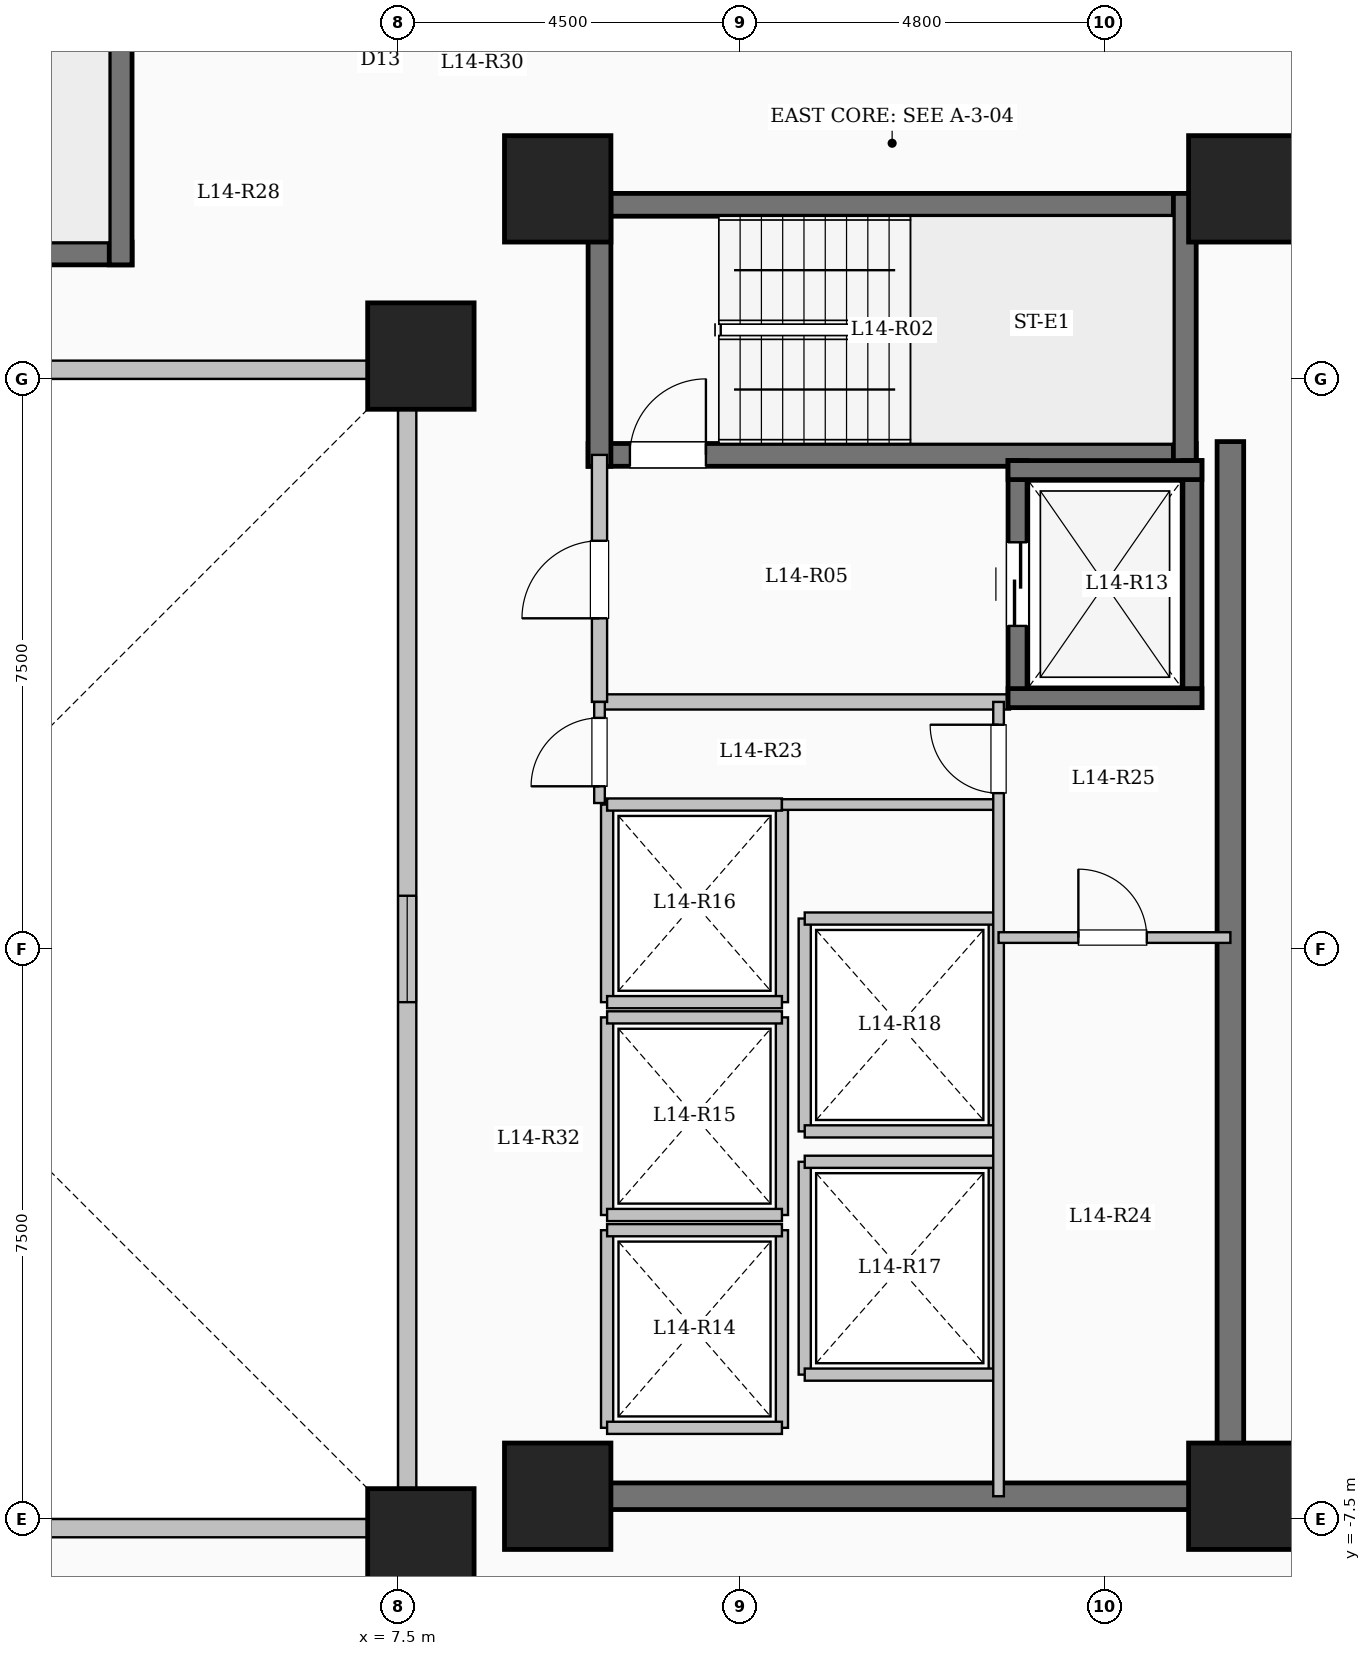
"""IFC4 building model, lengths in metres.
Left out: names, types, materials, properties, quantities, classifications, styles, units other than length and angle.
Written with IfcOpenShell. Run it as: python <this file> out.ifc"""

import sys

from ifc_helpers import new_model, si_unit, direction, frame, frame_2d, origin, origin_2d, place, context, subcontext, project, spatial, rectangle, extrude, element, fill, save


model = new_model("IFC4")
c1 = context("Model", 3, precision=1e-05, world=origin(), true_north=direction((0.0, 1.0)))
c2 = subcontext(c1, "Body", "Model", "MODEL_VIEW")
j1 = project(units=[si_unit("LENGTHUNIT", "METRE"), si_unit("PLANEANGLEUNIT", "RADIAN")], contexts=[c1])
p1 = place(None, origin())
s1 = spatial("IfcSite", under=j1, at=p1, CompositionType="ELEMENT")
p2 = place(p1, origin())
s2 = spatial("IfcBuilding", under=s1, at=p2, CompositionType="ELEMENT")
p3 = place(p2, frame((0.0, 0.0, 54.15)))
s3 = spatial("IfcBuildingStorey", under=s2, at=p3, CompositionType="ELEMENT", Elevation=54.15)
for number, where, z_axis, x_axis in (
    (1, (7.8, -7.8, 0.0), (0.0, 0.0, 1.0), (1.0, 0.0, 0.0)),
    (2, (7.8, 7.8, 0.0), (0.0, 0.0, 1.0), (1.0, 0.0, 0.0)),
    (3, (9.6, -7.2, 0.0), (0.0, 0.0, 1.0), (1.0, 0.0, 0.0)),
    (4, (9.6, 10.0, 0.0), (0.0, 0.0, 1.0), (1.0, 0.0, 0.0)),
    (5, (18.6, -7.2, 0.0), (0.0, 0.0, 1.0), (1.0, 0.0, 0.0)),
    (6, (18.6, 10.0, 0.0), (0.0, 0.0, 1.0), (1.0, 0.0, 0.0)),
):
    element("IfcColumn", number, at=place(p3, frame(where, z_axis=z_axis, x_axis=x_axis)), inside=s3, PredefinedType="COLUMN", context=c2, shape_type="SweptSolid", body=[
        extrude(rectangle(XDim=1.4, YDim=1.4, at=origin_2d()), origin(), (0.0, 0.0, 1.0), 3.35),
    ])
p4 = place(p3, frame((-7.62, -7.62, 0.0), z_axis=(0.0, 0.0, 1.0), x_axis=(1.0, 0.0, 0.0)))
e7 = element("IfcWall", 7, at=p4, inside=s3, PredefinedType="SOLIDWALL", context=c2, shape_type="SweptSolid", body=[
    extrude(rectangle(XDim=15.24, YDim=0.24, at=frame_2d((7.62, 0.0))), origin(), (0.0, 0.0, 1.0), 3.1),
])
p5 = place(p4, frame((6.92, 0.0, 0.95)))
e8 = element("IfcOpeningElement", 8, at=p5, cuts=e7, PredefinedType="OPENING", context=c2, shape_type="SweptSolid", body=[
    extrude(rectangle(XDim=1.4, YDim=1.5, at=frame_2d((0.7, 0.75))), frame((0.0, 0.13, 0.0), z_axis=(0.0, -1.0, 0.0), x_axis=(1.0, 0.0, 0.0)), (0.0, 0.0, 1.0), 0.26),
])
p6 = place(p3, frame((7.62, -7.62, 0.0), z_axis=(0.0, 0.0, 1.0), x_axis=(0.0, 1.0, 0.0)))
e9 = element("IfcWall", 9, at=p6, inside=s3, PredefinedType="SOLIDWALL", context=c2, shape_type="SweptSolid", body=[
    extrude(rectangle(XDim=15.24, YDim=0.24, at=frame_2d((7.62, 0.0))), origin(), (0.0, 0.0, 1.0), 3.1),
])
p7 = place(p6, frame((6.92, 0.0, 0.95)))
e10 = element("IfcOpeningElement", 10, at=p7, cuts=e9, PredefinedType="OPENING", context=c2, shape_type="SweptSolid", body=[
    extrude(rectangle(XDim=1.4, YDim=1.5, at=frame_2d((0.7, 0.75))), frame((0.0, 0.13, 0.0), z_axis=(0.0, -1.0, 0.0), x_axis=(1.0, 0.0, 0.0)), (0.0, 0.0, 1.0), 0.26),
])
p8 = place(p3, frame((7.62, 7.62, 0.0), z_axis=(0.0, 0.0, 1.0), x_axis=(-1.0, 0.0, 0.0)))
e11 = element("IfcWall", 11, at=p8, inside=s3, PredefinedType="SOLIDWALL", context=c2, shape_type="SweptSolid", body=[
    extrude(rectangle(XDim=15.24, YDim=0.24, at=frame_2d((7.62, 0.0))), origin(), (0.0, 0.0, 1.0), 3.1),
])
p9 = place(p8, frame((6.92, 0.0, 0.95)))
e12 = element("IfcOpeningElement", 12, at=p9, cuts=e11, PredefinedType="OPENING", context=c2, shape_type="SweptSolid", body=[
    extrude(rectangle(XDim=1.4, YDim=1.5, at=frame_2d((0.7, 0.75))), frame((0.0, 0.13, 0.0), z_axis=(0.0, -1.0, 0.0), x_axis=(1.0, 0.0, 0.0)), (0.0, 0.0, 1.0), 0.26),
])
p10 = place(p3, frame((10.0, 9.79, 0.0), z_axis=(0.0, 0.0, 1.0), x_axis=(1.0, 0.0, 0.0)))
e13 = element("IfcWall", 13, at=p10, inside=s3, PredefinedType="SHEAR", context=c2, shape_type="SweptSolid", body=[
    extrude(rectangle(XDim=8.0, YDim=0.3, at=frame_2d((4.0, 0.0))), origin(), (0.0, 0.0, 1.0), 3.35),
])
p11 = place(p3, frame((10.0, 6.5, 0.0), z_axis=(0.0, 0.0, 1.0), x_axis=(1.0, 0.0, 0.0)))
e14 = element("IfcWall", 14, at=p11, inside=s3, PredefinedType="SHEAR", context=c2, shape_type="SweptSolid", body=[
    extrude(rectangle(XDim=8.0, YDim=0.3, at=frame_2d((4.0, 0.0))), origin(), (0.0, 0.0, 1.0), 3.35),
])
p12 = place(p11, frame((0.55, 0.0, 0.0)))
e15 = element("IfcOpeningElement", 15, at=p12, cuts=e14, PredefinedType="OPENING", context=c2, shape_type="SweptSolid", body=[
    extrude(rectangle(XDim=1.0, YDim=2.15, at=frame_2d((0.5, 1.075))), frame((0.0, 0.16, 0.0), z_axis=(0.0, -1.0, 0.0), x_axis=(1.0, 0.0, 0.0)), (0.0, 0.0, 1.0), 0.32),
])
for number, where, z_axis, x_axis in (
    (16, (10.15, 6.35, 0.0), (0.0, 0.0, 1.0), (0.0, 1.0, 0.0)),
    (17, (17.85, 6.35, 0.0), (0.0, 0.0, 1.0), (0.0, 1.0, 0.0)),
):
    element("IfcWall", number, at=place(p3, frame(where, z_axis=z_axis, x_axis=x_axis)), inside=s3, PredefinedType="SHEAR", context=c2, shape_type="SweptSolid", body=[
        extrude(rectangle(XDim=3.59, YDim=0.3, at=frame_2d((1.795, 0.0))), origin(), (0.0, 0.0, 1.0), 3.35),
    ])
p13 = place(p3, frame((-4.0, 9.15, 0.0), z_axis=(0.0, 0.0, 1.0), x_axis=(1.0, 0.0, 0.0)))
e18 = element("IfcWall", 18, at=p13, inside=s3, PredefinedType="SHEAR", context=c2, shape_type="SweptSolid", body=[
    extrude(rectangle(XDim=8.0, YDim=0.3, at=frame_2d((4.0, 0.0))), origin(), (0.0, 0.0, 1.0), 3.35),
])
p14 = place(p13, frame((0.55, 0.0, 0.0)))
e19 = element("IfcOpeningElement", 19, at=p14, cuts=e18, PredefinedType="OPENING", context=c2, shape_type="SweptSolid", body=[
    extrude(rectangle(XDim=1.0, YDim=2.15, at=frame_2d((0.5, 1.075))), frame((0.0, 0.16, 0.0), z_axis=(0.0, -1.0, 0.0), x_axis=(1.0, 0.0, 0.0)), (0.0, 0.0, 1.0), 0.32),
])
p15 = place(p3, frame((3.85, 9.0, 0.0), z_axis=(0.0, 0.0, 1.0), x_axis=(0.0, 1.0, 0.0)))
e20 = element("IfcWall", 20, at=p15, inside=s3, PredefinedType="SHEAR", context=c2, shape_type="SweptSolid", body=[
    extrude(rectangle(XDim=3.59, YDim=0.3, at=frame_2d((1.795, 0.0))), origin(), (0.0, 0.0, 1.0), 3.35),
])
p16 = place(p3, frame((10.15, 3.25, 0.0), z_axis=(0.0, 0.0, 1.0), x_axis=(1.0, 0.0, 0.0)))
e21 = element("IfcWall", 21, at=p16, inside=s3, PredefinedType="SOLIDWALL", context=c2, shape_type="SweptSolid", body=[
    extrude(rectangle(XDim=5.4, YDim=0.2, at=frame_2d((2.7, 0.0))), origin(), (0.0, 0.0, 1.0), 3.1),
])
p17 = place(p3, frame((10.15, 3.25, 0.0), z_axis=(0.0, 0.0, 1.0), x_axis=(0.0, 1.0, 0.0)))
e22 = element("IfcWall", 22, at=p17, inside=s3, PredefinedType="SOLIDWALL", context=c2, shape_type="SweptSolid", body=[
    extrude(rectangle(XDim=3.25, YDim=0.2, at=frame_2d((1.625, 0.0))), origin(), (0.0, 0.0, 1.0), 3.1),
])
p18 = place(p17, frame((1.1, 0.0, 0.0)))
e23 = element("IfcOpeningElement", 23, at=p18, cuts=e22, PredefinedType="OPENING", context=c2, shape_type="SweptSolid", body=[
    extrude(rectangle(XDim=1.02, YDim=2.15, at=frame_2d((0.51, 1.075))), frame((0.0, 0.11, 0.0), z_axis=(0.0, -1.0, 0.0), x_axis=(1.0, 0.0, 0.0)), (0.0, 0.0, 1.0), 0.22),
])
p19 = place(p3, frame((15.65, 3.175, 0.0), z_axis=(0.0, 0.0, 1.0), x_axis=(0.0, 1.0, 0.0)))
e24 = element("IfcWall", 24, at=p19, inside=s3, PredefinedType="SHEAR", context=c2, shape_type="SweptSolid", body=[
    extrude(rectangle(XDim=3.25, YDim=0.25, at=frame_2d((1.625, 0.0))), origin(), (0.0, 0.0, 1.0), 3.35),
])
p20 = place(p19, frame((1.075, 0.0, 0.0)))
e25 = element("IfcOpeningElement", 25, at=p20, cuts=e24, PredefinedType="OPENING", context=c2, shape_type="SweptSolid", body=[
    extrude(rectangle(XDim=1.1, YDim=2.15, at=frame_2d((0.55, 1.075))), frame((0.0, 0.135, 0.0), z_axis=(0.0, -1.0, 0.0), x_axis=(1.0, 0.0, 0.0)), (0.0, 0.0, 1.0), 0.27),
])
p21 = place(p3, frame((17.95, 3.175, 0.0), z_axis=(0.0, 0.0, 1.0), x_axis=(0.0, 1.0, 0.0)))
e26 = element("IfcWall", 26, at=p21, inside=s3, PredefinedType="SHEAR", context=c2, shape_type="SweptSolid", body=[
    extrude(rectangle(XDim=3.25, YDim=0.25, at=frame_2d((1.625, 0.0))), origin(), (0.0, 0.0, 1.0), 3.35),
])
for number, where, z_axis, x_axis in (
    (27, (15.525, 3.3, 0.0), (0.0, 0.0, 1.0), (1.0, 0.0, 0.0)),
    (28, (15.525, 6.3, 0.0), (0.0, 0.0, 1.0), (1.0, 0.0, 0.0)),
):
    element("IfcWall", number, at=place(p3, frame(where, z_axis=z_axis, x_axis=x_axis)), inside=s3, PredefinedType="SHEAR", context=c2, shape_type="SweptSolid", body=[
        extrude(rectangle(XDim=2.55, YDim=0.25, at=frame_2d((1.275, 0.0))), origin(), (0.0, 0.0, 1.0), 3.35),
    ])
for number, where, z_axis, x_axis in (
    (29, (10.25, -6.3, 0.0), (0.0, 0.0, 1.0), (0.0, 1.0, 0.0)),
    (30, (12.55, -6.3, 0.0), (0.0, 0.0, 1.0), (0.0, 1.0, 0.0)),
):
    element("IfcWall", number, at=place(p3, frame(where, z_axis=z_axis, x_axis=x_axis)), inside=s3, PredefinedType="SOLIDWALL", context=c2, shape_type="SweptSolid", body=[
        extrude(rectangle(XDim=2.6, YDim=0.16, at=frame_2d((1.3, 0.0))), origin(), (0.0, 0.0, 1.0), 3.1),
    ])
for number, where, z_axis, x_axis in (
    (31, (10.25, -6.3, 0.0), (0.0, 0.0, 1.0), (1.0, 0.0, 0.0)),
    (32, (10.25, -3.7, 0.0), (0.0, 0.0, 1.0), (1.0, 0.0, 0.0)),
):
    element("IfcWall", number, at=place(p3, frame(where, z_axis=z_axis, x_axis=x_axis)), inside=s3, PredefinedType="SOLIDWALL", context=c2, shape_type="SweptSolid", body=[
        extrude(rectangle(XDim=2.3, YDim=0.16, at=frame_2d((1.15, 0.0))), origin(), (0.0, 0.0, 1.0), 3.1),
    ])
for number, where, z_axis, x_axis in (
    (33, (10.25, -3.5, 0.0), (0.0, 0.0, 1.0), (0.0, 1.0, 0.0)),
    (34, (12.55, -3.5, 0.0), (0.0, 0.0, 1.0), (0.0, 1.0, 0.0)),
):
    element("IfcWall", number, at=place(p3, frame(where, z_axis=z_axis, x_axis=x_axis)), inside=s3, PredefinedType="SOLIDWALL", context=c2, shape_type="SweptSolid", body=[
        extrude(rectangle(XDim=2.6, YDim=0.16, at=frame_2d((1.3, 0.0))), origin(), (0.0, 0.0, 1.0), 3.1),
    ])
for number, where, z_axis, x_axis in (
    (35, (10.25, -3.5, 0.0), (0.0, 0.0, 1.0), (1.0, 0.0, 0.0)),
    (36, (10.25, -0.9, 0.0), (0.0, 0.0, 1.0), (1.0, 0.0, 0.0)),
):
    element("IfcWall", number, at=place(p3, frame(where, z_axis=z_axis, x_axis=x_axis)), inside=s3, PredefinedType="SOLIDWALL", context=c2, shape_type="SweptSolid", body=[
        extrude(rectangle(XDim=2.3, YDim=0.16, at=frame_2d((1.15, 0.0))), origin(), (0.0, 0.0, 1.0), 3.1),
    ])
for number, where, z_axis, x_axis in (
    (37, (10.25, -0.7, 0.0), (0.0, 0.0, 1.0), (0.0, 1.0, 0.0)),
    (38, (12.55, -0.7, 0.0), (0.0, 0.0, 1.0), (0.0, 1.0, 0.0)),
):
    element("IfcWall", number, at=place(p3, frame(where, z_axis=z_axis, x_axis=x_axis)), inside=s3, PredefinedType="SOLIDWALL", context=c2, shape_type="SweptSolid", body=[
        extrude(rectangle(XDim=2.6, YDim=0.16, at=frame_2d((1.3, 0.0))), origin(), (0.0, 0.0, 1.0), 3.1),
    ])
for number, where, z_axis, x_axis in (
    (39, (10.25, -0.7, 0.0), (0.0, 0.0, 1.0), (1.0, 0.0, 0.0)),
    (40, (10.25, 1.9, 0.0), (0.0, 0.0, 1.0), (1.0, 0.0, 0.0)),
):
    element("IfcWall", number, at=place(p3, frame(where, z_axis=z_axis, x_axis=x_axis)), inside=s3, PredefinedType="SOLIDWALL", context=c2, shape_type="SweptSolid", body=[
        extrude(rectangle(XDim=2.3, YDim=0.16, at=frame_2d((1.15, 0.0))), origin(), (0.0, 0.0, 1.0), 3.1),
    ])
for number, where, z_axis, x_axis in (
    (41, (12.85, -5.6, 0.0), (0.0, 0.0, 1.0), (0.0, 1.0, 0.0)),
    (42, (15.35, -5.6, 0.0), (0.0, 0.0, 1.0), (0.0, 1.0, 0.0)),
):
    element("IfcWall", number, at=place(p3, frame(where, z_axis=z_axis, x_axis=x_axis)), inside=s3, PredefinedType="SOLIDWALL", context=c2, shape_type="SweptSolid", body=[
        extrude(rectangle(XDim=2.8, YDim=0.16, at=frame_2d((1.4, 0.0))), origin(), (0.0, 0.0, 1.0), 3.1),
    ])
for number, where, z_axis, x_axis in (
    (43, (12.85, -5.6, 0.0), (0.0, 0.0, 1.0), (1.0, 0.0, 0.0)),
    (44, (12.85, -2.8, 0.0), (0.0, 0.0, 1.0), (1.0, 0.0, 0.0)),
):
    element("IfcWall", number, at=place(p3, frame(where, z_axis=z_axis, x_axis=x_axis)), inside=s3, PredefinedType="SOLIDWALL", context=c2, shape_type="SweptSolid", body=[
        extrude(rectangle(XDim=2.5, YDim=0.16, at=frame_2d((1.25, 0.0))), origin(), (0.0, 0.0, 1.0), 3.1),
    ])
for number, where, z_axis, x_axis in (
    (45, (12.85, -2.4, 0.0), (0.0, 0.0, 1.0), (0.0, 1.0, 0.0)),
    (46, (15.35, -2.4, 0.0), (0.0, 0.0, 1.0), (0.0, 1.0, 0.0)),
):
    element("IfcWall", number, at=place(p3, frame(where, z_axis=z_axis, x_axis=x_axis)), inside=s3, PredefinedType="SOLIDWALL", context=c2, shape_type="SweptSolid", body=[
        extrude(rectangle(XDim=2.8, YDim=0.16, at=frame_2d((1.4, 0.0))), origin(), (0.0, 0.0, 1.0), 3.1),
    ])
for number, where, z_axis, x_axis in (
    (47, (12.85, -2.4, 0.0), (0.0, 0.0, 1.0), (1.0, 0.0, 0.0)),
    (48, (12.85, 0.4, 0.0), (0.0, 0.0, 1.0), (1.0, 0.0, 0.0)),
):
    element("IfcWall", number, at=place(p3, frame(where, z_axis=z_axis, x_axis=x_axis)), inside=s3, PredefinedType="SOLIDWALL", context=c2, shape_type="SweptSolid", body=[
        extrude(rectangle(XDim=2.5, YDim=0.16, at=frame_2d((1.25, 0.0))), origin(), (0.0, 0.0, 1.0), 3.1),
    ])
p22 = place(p3, frame((18.45, -7.375, 0.0), z_axis=(0.0, 0.0, 1.0), x_axis=(0.0, 1.0, 0.0)))
e49 = element("IfcWall", 49, at=p22, inside=s3, PredefinedType="SHEAR", context=c2, shape_type="SweptSolid", body=[
    extrude(rectangle(XDim=14.05, YDim=0.35, at=frame_2d((7.025, 0.0))), origin(), (0.0, 0.0, 1.0), 3.35),
])
p23 = place(p3, frame((10.075, -7.2, 0.0), z_axis=(0.0, 0.0, 1.0), x_axis=(1.0, 0.0, 0.0)))
e50 = element("IfcWall", 50, at=p23, inside=s3, PredefinedType="SHEAR", context=c2, shape_type="SweptSolid", body=[
    extrude(rectangle(XDim=8.55, YDim=0.35, at=frame_2d((4.275, 0.0))), origin(), (0.0, 0.0, 1.0), 3.35),
])
p24 = place(p3, frame((12.55, 1.9, 0.0), z_axis=(0.0, 0.0, 1.0), x_axis=(1.0, 0.0, 0.0)))
e51 = element("IfcWall", 51, at=p24, inside=s3, PredefinedType="PARTITIONING", context=c2, shape_type="SweptSolid", body=[
    extrude(rectangle(XDim=2.85, YDim=0.14, at=frame_2d((1.425, 0.0))), origin(), (0.0, 0.0, 1.0), 3.1),
])
p25 = place(p3, frame((10.15, 1.92, 0.0), z_axis=(0.0, 0.0, 1.0), x_axis=(0.0, 1.0, 0.0)))
e52 = element("IfcWall", 52, at=p25, inside=s3, PredefinedType="PARTITIONING", context=c2, shape_type="SweptSolid", body=[
    extrude(rectangle(XDim=1.33, YDim=0.14, at=frame_2d((0.665, 0.0))), origin(), (0.0, 0.0, 1.0), 3.1),
])
p26 = place(p25, frame((0.22, 0.0, 0.0)))
e53 = element("IfcOpeningElement", 53, at=p26, cuts=e52, PredefinedType="OPENING", context=c2, shape_type="SweptSolid", body=[
    extrude(rectangle(XDim=0.9, YDim=2.08, at=frame_2d((0.45, 1.04))), frame((0.0, 0.08, 0.0), z_axis=(0.0, -1.0, 0.0), x_axis=(1.0, 0.0, 0.0)), (0.0, 0.0, 1.0), 0.16),
])
p27 = place(p3, frame((15.4, -7.2, 0.0), z_axis=(0.0, 0.0, 1.0), x_axis=(0.0, 1.0, 0.0)))
e54 = element("IfcWall", 54, at=p27, inside=s3, PredefinedType="PARTITIONING", context=c2, shape_type="SweptSolid", body=[
    extrude(rectangle(XDim=10.45, YDim=0.14, at=frame_2d((5.225, 0.0))), origin(), (0.0, 0.0, 1.0), 3.1),
])
p28 = place(p27, frame((9.25, 0.0, 0.0)))
e55 = element("IfcOpeningElement", 55, at=p28, cuts=e54, PredefinedType="OPENING", context=c2, shape_type="SweptSolid", body=[
    extrude(rectangle(XDim=0.9, YDim=2.08, at=frame_2d((0.45, 1.04))), frame((0.0, 0.08, 0.0), z_axis=(0.0, -1.0, 0.0), x_axis=(1.0, 0.0, 0.0)), (0.0, 0.0, 1.0), 0.16),
])
p29 = place(p3, frame((15.4, 0.15, 0.0), z_axis=(0.0, 0.0, 1.0), x_axis=(1.0, 0.0, 0.0)))
e56 = element("IfcWall", 56, at=p29, inside=s3, PredefinedType="PARTITIONING", context=c2, shape_type="SweptSolid", body=[
    extrude(rectangle(XDim=3.05, YDim=0.14, at=frame_2d((1.525, 0.0))), origin(), (0.0, 0.0, 1.0), 3.1),
])
p30 = place(p29, frame((1.05, 0.0, 0.0)))
e57 = element("IfcOpeningElement", 57, at=p30, cuts=e56, PredefinedType="OPENING", context=c2, shape_type="SweptSolid", body=[
    extrude(rectangle(XDim=0.9, YDim=2.08, at=frame_2d((0.45, 1.04))), frame((0.0, 0.08, 0.0), z_axis=(0.0, -1.0, 0.0), x_axis=(1.0, 0.0, 0.0)), (0.0, 0.0, 1.0), 0.16),
])
p31 = place(p7, origin())
e58 = element("IfcWindow", 58, at=p31, inside=s3, PartitioningType="SINGLE_PANEL", PredefinedType="WINDOW", context=c2, shape_type="SweptSolid", body=[
    extrude(rectangle(XDim=1.4, YDim=1.5, at=frame_2d((0.7, 0.75))), frame((0.0, 0.03, 0.0), z_axis=(0.0, -1.0, 0.0), x_axis=(1.0, 0.0, 0.0)), (0.0, 0.0, 1.0), 0.06),
])
fill(e10, e58)
p32 = place(p12, origin())
e59 = element("IfcDoor", 59, at=p32, inside=s3, OperationType="SINGLE_SWING_RIGHT", PredefinedType="DOOR", context=c2, shape_type="SweptSolid", body=[
    extrude(rectangle(XDim=1.0, YDim=2.15, at=frame_2d((0.5, 1.075))), frame((0.0, 0.025, 0.0), z_axis=(0.0, -1.0, 0.0), x_axis=(1.0, 0.0, 0.0)), (0.0, 0.0, 1.0), 0.05),
])
fill(e15, e59)
p33 = place(p18, origin())
e60 = element("IfcDoor", 60, at=p33, inside=s3, OperationType="SINGLE_SWING_LEFT", PredefinedType="DOOR", context=c2, shape_type="SweptSolid", body=[
    extrude(rectangle(XDim=1.02, YDim=2.15, at=frame_2d((0.51, 1.075))), frame((0.0, 0.025, 0.0), z_axis=(0.0, -1.0, 0.0), x_axis=(1.0, 0.0, 0.0)), (0.0, 0.0, 1.0), 0.05),
])
fill(e23, e60)
p34 = place(p20, origin())
e61 = element("IfcDoor", 61, at=p34, inside=s3, OperationType="SLIDING_TO_LEFT", PredefinedType="DOOR", context=c2, shape_type="SweptSolid", body=[
    extrude(rectangle(XDim=1.1, YDim=2.15, at=frame_2d((0.55, 1.075))), frame((0.0, 0.025, 0.0), z_axis=(0.0, -1.0, 0.0), x_axis=(1.0, 0.0, 0.0)), (0.0, 0.0, 1.0), 0.05),
])
fill(e25, e61)
p35 = place(p26, origin())
e62 = element("IfcDoor", 62, at=p35, inside=s3, OperationType="SINGLE_SWING_LEFT", PredefinedType="DOOR", context=c2, shape_type="SweptSolid", body=[
    extrude(rectangle(XDim=0.9, YDim=2.08, at=frame_2d((0.45, 1.04))), frame((0.0, 0.025, 0.0), z_axis=(0.0, -1.0, 0.0), x_axis=(1.0, 0.0, 0.0)), (0.0, 0.0, 1.0), 0.05),
])
fill(e53, e62)
p36 = place(p28, origin())
e63 = element("IfcDoor", 63, at=p36, inside=s3, OperationType="SINGLE_SWING_RIGHT", PredefinedType="DOOR", context=c2, shape_type="SweptSolid", body=[
    extrude(rectangle(XDim=0.9, YDim=2.08, at=frame_2d((0.45, 1.04))), frame((0.0, 0.025, 0.0), z_axis=(0.0, -1.0, 0.0), x_axis=(1.0, 0.0, 0.0)), (0.0, 0.0, 1.0), 0.05),
])
fill(e55, e63)
p37 = place(p30, origin())
e64 = element("IfcDoor", 64, at=p37, inside=s3, OperationType="SINGLE_SWING_LEFT", PredefinedType="DOOR", context=c2, shape_type="SweptSolid", body=[
    extrude(rectangle(XDim=0.9, YDim=2.08, at=frame_2d((0.45, 1.04))), frame((0.0, 0.025, 0.0), z_axis=(0.0, -1.0, 0.0), x_axis=(1.0, 0.0, 0.0)), (0.0, 0.0, 1.0), 0.05),
])
fill(e57, e64)
save(model, sys.argv[1])
